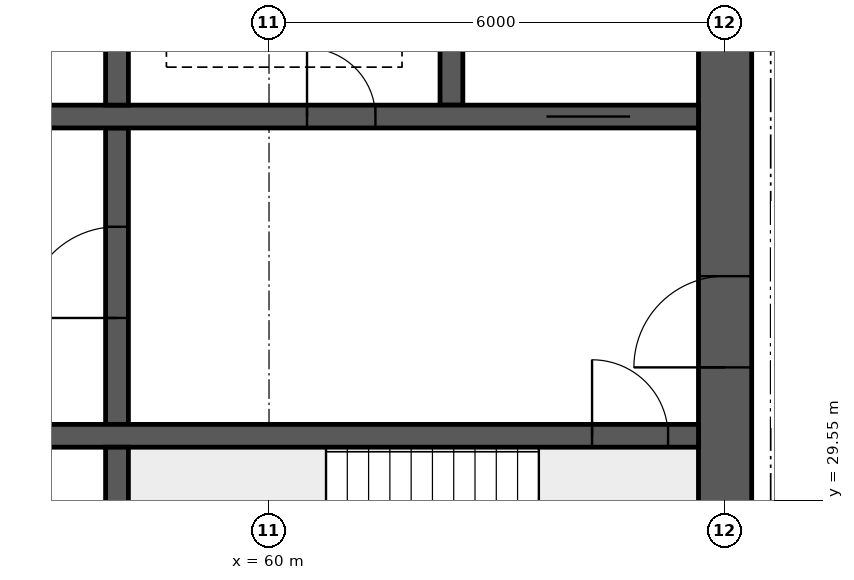
"""IFC4 building model, lengths in metres.
Left out: names, types, materials, properties, quantities, classifications, styles, units other than length and angle.
Written with IfcOpenShell. Run it as: python <this file> out.ifc"""

import sys

from ifc_helpers import new_model, si_unit, direction, frame, frame_2d, origin, place, context, subcontext, project, spatial, rectangle, extrude, element, fill, save


model = new_model("IFC4")
c1 = context("Model", 3, precision=1e-05, world=origin(), true_north=direction((0.0, 1.0)))
c2 = subcontext(c1, "Body", "Model", "MODEL_VIEW")
j1 = project(units=[si_unit("LENGTHUNIT", "METRE"), si_unit("PLANEANGLEUNIT", "RADIAN")], contexts=[c1])
p1 = place(None, origin())
s1 = spatial("IfcSite", under=j1, at=p1, CompositionType="ELEMENT")
p2 = place(p1, origin())
s2 = spatial("IfcBuilding", under=s1, at=p2, CompositionType="ELEMENT")
p3 = place(p2, frame((0.0, 0.0, 224.05)))
s3 = spatial("IfcBuildingStorey", under=s2, at=p3, CompositionType="ELEMENT", Elevation=224.05)
p4 = place(p3, frame((66.0, 26.15, 0.0), z_axis=(0.0, 0.0, 1.0), x_axis=(0.0, 1.0, 0.0)))
e1 = element("IfcWall", 1, at=p4, inside=s3, PredefinedType="SHEAR", context=c2, shape_type="SweptSolid", body=[
    extrude(rectangle(XDim=11.7, YDim=0.7, at=frame_2d((5.85, 0.0))), origin(), (0.0, 0.0, 1.0), 3.75),
])
p5 = place(p4, frame((5.15, 0.0, 0.0)))
e2 = element("IfcOpeningElement", 2, at=p5, cuts=e1, PredefinedType="OPENING", context=c2, shape_type="SweptSolid", body=[
    extrude(rectangle(XDim=1.2, YDim=2.1, at=frame_2d((0.6, 1.05))), frame((0.0, 0.36, 0.0), z_axis=(0.0, -1.0, 0.0), x_axis=(1.0, 0.0, 0.0)), (0.0, 0.0, 1.0), 0.72),
])
p6 = place(p3, frame((18.35, 30.4, 0.0), z_axis=(0.0, 0.0, 1.0), x_axis=(1.0, 0.0, 0.0)))
e3 = element("IfcWall", 3, at=p6, inside=s3, PredefinedType="SHEAR", context=c2, shape_type="SweptSolid", body=[
    extrude(rectangle(XDim=47.3, YDim=0.3, at=frame_2d((23.65, 0.0))), origin(), (0.0, 0.0, 1.0), 3.75),
])
p7 = place(p6, frame((0.4, 0.0, 0.0)))
e4 = element("IfcOpeningElement", 4, at=p7, cuts=e3, PredefinedType="OPENING", context=c2, shape_type="SweptSolid", body=[
    extrude(rectangle(XDim=1.0, YDim=2.1, at=frame_2d((0.5, 1.05))), frame((0.0, 0.16, 0.0), z_axis=(0.0, -1.0, 0.0), x_axis=(1.0, 0.0, 0.0)), (0.0, 0.0, 1.0), 0.32),
])
p8 = place(p6, frame((45.9, 0.0, 0.0)))
e5 = element("IfcOpeningElement", 5, at=p8, cuts=e3, PredefinedType="OPENING", context=c2, shape_type="SweptSolid", body=[
    extrude(rectangle(XDim=1.0, YDim=2.1, at=frame_2d((0.5, 1.05))), frame((0.0, 0.16, 0.0), z_axis=(0.0, -1.0, 0.0), x_axis=(1.0, 0.0, 0.0)), (0.0, 0.0, 1.0), 0.32),
])
p9 = place(p6, frame((8.4, 0.0, 0.0)))
e6 = element("IfcOpeningElement", 6, at=p9, cuts=e3, PredefinedType="OPENING", context=c2, shape_type="SweptSolid", body=[
    extrude(rectangle(XDim=1.1, YDim=2.1, at=frame_2d((0.55, 1.05))), frame((0.0, 0.16, 0.0), z_axis=(0.0, -1.0, 0.0), x_axis=(1.0, 0.0, 0.0)), (0.0, 0.0, 1.0), 0.32),
])
p10 = place(p6, frame((11.0, 0.0, 0.0)))
e7 = element("IfcOpeningElement", 7, at=p10, cuts=e3, PredefinedType="OPENING", context=c2, shape_type="SweptSolid", body=[
    extrude(rectangle(XDim=1.1, YDim=2.1, at=frame_2d((0.55, 1.05))), frame((0.0, 0.16, 0.0), z_axis=(0.0, -1.0, 0.0), x_axis=(1.0, 0.0, 0.0)), (0.0, 0.0, 1.0), 0.32),
])
p11 = place(p6, frame((13.6, 0.0, 0.0)))
e8 = element("IfcOpeningElement", 8, at=p11, cuts=e3, PredefinedType="OPENING", context=c2, shape_type="SweptSolid", body=[
    extrude(rectangle(XDim=1.1, YDim=2.1, at=frame_2d((0.55, 1.05))), frame((0.0, 0.16, 0.0), z_axis=(0.0, -1.0, 0.0), x_axis=(1.0, 0.0, 0.0)), (0.0, 0.0, 1.0), 0.32),
])
p12 = place(p6, frame((16.2, 0.0, 0.0)))
e9 = element("IfcOpeningElement", 9, at=p12, cuts=e3, PredefinedType="OPENING", context=c2, shape_type="SweptSolid", body=[
    extrude(rectangle(XDim=1.1, YDim=2.1, at=frame_2d((0.55, 1.05))), frame((0.0, 0.16, 0.0), z_axis=(0.0, -1.0, 0.0), x_axis=(1.0, 0.0, 0.0)), (0.0, 0.0, 1.0), 0.32),
])
p13 = place(p6, frame((18.975, 0.0, 0.0)))
e10 = element("IfcOpeningElement", 10, at=p13, cuts=e3, PredefinedType="OPENING", context=c2, shape_type="SweptSolid", body=[
    extrude(rectangle(XDim=0.9, YDim=2.1, at=frame_2d((0.45, 1.05))), frame((0.0, 0.16, 0.0), z_axis=(0.0, -1.0, 0.0), x_axis=(1.0, 0.0, 0.0)), (0.0, 0.0, 1.0), 0.32),
])
p14 = place(p6, frame((24.475, 0.0, 0.0)))
e11 = element("IfcOpeningElement", 11, at=p14, cuts=e3, PredefinedType="OPENING", context=c2, shape_type="SweptSolid", body=[
    extrude(rectangle(XDim=0.9, YDim=2.1, at=frame_2d((0.45, 1.05))), frame((0.0, 0.16, 0.0), z_axis=(0.0, -1.0, 0.0), x_axis=(1.0, 0.0, 0.0)), (0.0, 0.0, 1.0), 0.32),
])
p15 = place(p6, frame((30.267, 0.0, 0.0)))
e12 = element("IfcOpeningElement", 12, at=p15, cuts=e3, PredefinedType="OPENING", context=c2, shape_type="SweptSolid", body=[
    extrude(rectangle(XDim=1.1, YDim=2.1, at=frame_2d((0.55, 1.05))), frame((0.0, 0.16, 0.0), z_axis=(0.0, -1.0, 0.0), x_axis=(1.0, 0.0, 0.0)), (0.0, 0.0, 1.0), 0.32),
])
p16 = place(p6, frame((33.8, 0.0, 0.0)))
e13 = element("IfcOpeningElement", 13, at=p16, cuts=e3, PredefinedType="OPENING", context=c2, shape_type="SweptSolid", body=[
    extrude(rectangle(XDim=1.1, YDim=2.1, at=frame_2d((0.55, 1.05))), frame((0.0, 0.16, 0.0), z_axis=(0.0, -1.0, 0.0), x_axis=(1.0, 0.0, 0.0)), (0.0, 0.0, 1.0), 0.32),
])
p17 = place(p6, frame((37.333, 0.0, 0.0)))
e14 = element("IfcOpeningElement", 14, at=p17, cuts=e3, PredefinedType="OPENING", context=c2, shape_type="SweptSolid", body=[
    extrude(rectangle(XDim=1.1, YDim=2.1, at=frame_2d((0.55, 1.05))), frame((0.0, 0.16, 0.0), z_axis=(0.0, -1.0, 0.0), x_axis=(1.0, 0.0, 0.0)), (0.0, 0.0, 1.0), 0.32),
])
p18 = place(p3, frame((18.35, 34.6, 0.0), z_axis=(0.0, 0.0, 1.0), x_axis=(1.0, 0.0, 0.0)))
e15 = element("IfcWall", 15, at=p18, inside=s3, PredefinedType="SHEAR", context=c2, shape_type="SweptSolid", body=[
    extrude(rectangle(XDim=47.3, YDim=0.3, at=frame_2d((23.65, 0.0))), origin(), (0.0, 0.0, 1.0), 3.75),
])
p19 = place(p18, frame((0.9, 0.0, 0.0)))
e16 = element("IfcOpeningElement", 16, at=p19, cuts=e15, PredefinedType="OPENING", context=c2, shape_type="SweptSolid", body=[
    extrude(rectangle(XDim=1.1, YDim=2.1, at=frame_2d((0.55, 1.05))), frame((0.0, 0.16, 0.0), z_axis=(0.0, -1.0, 0.0), x_axis=(1.0, 0.0, 0.0)), (0.0, 0.0, 1.0), 0.32),
])
p20 = place(p18, frame((45.3, 0.0, 0.0)))
e17 = element("IfcOpeningElement", 17, at=p20, cuts=e15, PredefinedType="OPENING", context=c2, shape_type="SweptSolid", body=[
    extrude(rectangle(XDim=1.1, YDim=2.1, at=frame_2d((0.55, 1.05))), frame((0.0, 0.16, 0.0), z_axis=(0.0, -1.0, 0.0), x_axis=(1.0, 0.0, 0.0)), (0.0, 0.0, 1.0), 0.32),
])
p21 = place(p18, frame((4.25, 0.0, 0.0)))
e18 = element("IfcOpeningElement", 18, at=p21, cuts=e15, PredefinedType="OPENING", context=c2, shape_type="SweptSolid", body=[
    extrude(rectangle(XDim=0.9, YDim=2.1, at=frame_2d((0.45, 1.05))), frame((0.0, 0.16, 0.0), z_axis=(0.0, -1.0, 0.0), x_axis=(1.0, 0.0, 0.0)), (0.0, 0.0, 1.0), 0.32),
])
p22 = place(p18, frame((42.15, 0.0, 0.0)))
e19 = element("IfcOpeningElement", 19, at=p22, cuts=e15, PredefinedType="OPENING", context=c2, shape_type="SweptSolid", body=[
    extrude(rectangle(XDim=0.9, YDim=2.1, at=frame_2d((0.45, 1.05))), frame((0.0, 0.16, 0.0), z_axis=(0.0, -1.0, 0.0), x_axis=(1.0, 0.0, 0.0)), (0.0, 0.0, 1.0), 0.32),
])
p23 = place(p18, frame((9.025, 0.0, 0.0)))
e20 = element("IfcOpeningElement", 20, at=p23, cuts=e15, PredefinedType="OPENING", context=c2, shape_type="SweptSolid", body=[
    extrude(rectangle(XDim=0.9, YDim=2.1, at=frame_2d((0.45, 1.05))), frame((0.0, 0.16, 0.0), z_axis=(0.0, -1.0, 0.0), x_axis=(1.0, 0.0, 0.0)), (0.0, 0.0, 1.0), 0.32),
])
p24 = place(p18, frame((12.999, 0.0, 0.0)))
e21 = element("IfcOpeningElement", 21, at=p24, cuts=e15, PredefinedType="OPENING", context=c2, shape_type="SweptSolid", body=[
    extrude(rectangle(XDim=0.9, YDim=2.1, at=frame_2d((0.45, 1.05))), frame((0.0, 0.16, 0.0), z_axis=(0.0, -1.0, 0.0), x_axis=(1.0, 0.0, 0.0)), (0.0, 0.0, 1.0), 0.32),
])
p25 = place(p18, frame((16.646, 0.0, 0.0)))
e22 = element("IfcOpeningElement", 22, at=p25, cuts=e15, PredefinedType="OPENING", context=c2, shape_type="SweptSolid", body=[
    extrude(rectangle(XDim=0.9, YDim=2.1, at=frame_2d((0.45, 1.05))), frame((0.0, 0.16, 0.0), z_axis=(0.0, -1.0, 0.0), x_axis=(1.0, 0.0, 0.0)), (0.0, 0.0, 1.0), 0.32),
])
p26 = place(p18, frame((20.405, 0.0, 0.0)))
e23 = element("IfcOpeningElement", 23, at=p26, cuts=e15, PredefinedType="OPENING", context=c2, shape_type="SweptSolid", body=[
    extrude(rectangle(XDim=0.9, YDim=2.1, at=frame_2d((0.45, 1.05))), frame((0.0, 0.16, 0.0), z_axis=(0.0, -1.0, 0.0), x_axis=(1.0, 0.0, 0.0)), (0.0, 0.0, 1.0), 0.32),
])
p27 = place(p18, frame((24.811, 0.0, 0.0)))
e24 = element("IfcOpeningElement", 24, at=p27, cuts=e15, PredefinedType="OPENING", context=c2, shape_type="SweptSolid", body=[
    extrude(rectangle(XDim=0.9, YDim=2.1, at=frame_2d((0.45, 1.05))), frame((0.0, 0.16, 0.0), z_axis=(0.0, -1.0, 0.0), x_axis=(1.0, 0.0, 0.0)), (0.0, 0.0, 1.0), 0.32),
])
p28 = place(p18, frame((27.608, 0.0, 0.0)))
e25 = element("IfcOpeningElement", 25, at=p28, cuts=e15, PredefinedType="OPENING", context=c2, shape_type="SweptSolid", body=[
    extrude(rectangle(XDim=0.9, YDim=2.1, at=frame_2d((0.45, 1.05))), frame((0.0, 0.16, 0.0), z_axis=(0.0, -1.0, 0.0), x_axis=(1.0, 0.0, 0.0)), (0.0, 0.0, 1.0), 0.32),
])
p29 = place(p18, frame((29.575, 0.0, 0.0)))
e26 = element("IfcOpeningElement", 26, at=p29, cuts=e15, PredefinedType="OPENING", context=c2, shape_type="SweptSolid", body=[
    extrude(rectangle(XDim=0.9, YDim=2.1, at=frame_2d((0.45, 1.05))), frame((0.0, 0.16, 0.0), z_axis=(0.0, -1.0, 0.0), x_axis=(1.0, 0.0, 0.0)), (0.0, 0.0, 1.0), 0.32),
])
p30 = place(p18, frame((32.007, 0.0, 0.0)))
e27 = element("IfcOpeningElement", 27, at=p30, cuts=e15, PredefinedType="OPENING", context=c2, shape_type="SweptSolid", body=[
    extrude(rectangle(XDim=0.9, YDim=2.1, at=frame_2d((0.45, 1.05))), frame((0.0, 0.16, 0.0), z_axis=(0.0, -1.0, 0.0), x_axis=(1.0, 0.0, 0.0)), (0.0, 0.0, 1.0), 0.32),
])
p31 = place(p18, frame((34.742, 0.0, 0.0)))
e28 = element("IfcOpeningElement", 28, at=p31, cuts=e15, PredefinedType="OPENING", context=c2, shape_type="SweptSolid", body=[
    extrude(rectangle(XDim=0.9, YDim=2.1, at=frame_2d((0.45, 1.05))), frame((0.0, 0.16, 0.0), z_axis=(0.0, -1.0, 0.0), x_axis=(1.0, 0.0, 0.0)), (0.0, 0.0, 1.0), 0.32),
])
p32 = place(p18, frame((37.781, 0.0, 0.0)))
e29 = element("IfcOpeningElement", 29, at=p32, cuts=e15, PredefinedType="OPENING", context=c2, shape_type="SweptSolid", body=[
    extrude(rectangle(XDim=0.9, YDim=2.1, at=frame_2d((0.45, 1.05))), frame((0.0, 0.16, 0.0), z_axis=(0.0, -1.0, 0.0), x_axis=(1.0, 0.0, 0.0)), (0.0, 0.0, 1.0), 0.32),
])
p33 = place(p3, frame((58.0, 26.15, 0.0), z_axis=(0.0, 0.0, 1.0), x_axis=(0.0, 1.0, 0.0)))
e30 = element("IfcWall", 30, at=p33, inside=s3, PredefinedType="SHEAR", context=c2, shape_type="SweptSolid", body=[
    extrude(rectangle(XDim=4.1, YDim=0.3, at=frame_2d((2.05, 0.0))), origin(), (0.0, 0.0, 1.0), 3.75),
])
p34 = place(p3, frame((58.0, 30.55, 0.0), z_axis=(0.0, 0.0, 1.0), x_axis=(0.0, 1.0, 0.0)))
e31 = element("IfcWall", 31, at=p34, inside=s3, PredefinedType="SHEAR", context=c2, shape_type="SweptSolid", body=[
    extrude(rectangle(XDim=3.9, YDim=0.3, at=frame_2d((1.95, 0.0))), origin(), (0.0, 0.0, 1.0), 3.75),
])
p35 = place(p34, frame((1.4, 0.0, 0.0)))
e32 = element("IfcOpeningElement", 32, at=p35, cuts=e31, PredefinedType="OPENING", context=c2, shape_type="SweptSolid", body=[
    extrude(rectangle(XDim=1.2, YDim=2.1, at=frame_2d((0.6, 1.05))), frame((0.0, 0.16, 0.0), z_axis=(0.0, -1.0, 0.0), x_axis=(1.0, 0.0, 0.0)), (0.0, 0.0, 1.0), 0.32),
])
for number, where, z_axis, x_axis in (
    (33, (62.4, 34.75, 0.0), (0.0, 0.0, 1.0), (0.0, 1.0, 0.0)),
    (34, (58.0, 34.75, 0.0), (0.0, 0.0, 1.0), (0.0, 1.0, 0.0)),
):
    element("IfcWall", number, at=place(p3, frame(where, z_axis=z_axis, x_axis=x_axis)), inside=s3, PredefinedType="SHEAR", context=c2, shape_type="SweptSolid", body=[
        extrude(rectangle(XDim=3.1, YDim=0.3, at=frame_2d((1.55, 0.0))), origin(), (0.0, 0.0, 1.0), 3.75),
    ])
p36 = place(p5, origin())
e35 = element("IfcDoor", 35, at=p36, inside=s3, OperationType="SINGLE_SWING_LEFT", PredefinedType="DOOR", context=c2, shape_type="SweptSolid", body=[
    extrude(rectangle(XDim=1.2, YDim=2.1, at=frame_2d((0.6, 1.05))), frame((0.0, 0.025, 0.0), z_axis=(0.0, -1.0, 0.0), x_axis=(1.0, 0.0, 0.0)), (0.0, 0.0, 1.0), 0.05),
])
fill(e2, e35)
p37 = place(p8, origin())
e36 = element("IfcDoor", 36, at=p37, inside=s3, OperationType="SINGLE_SWING_LEFT", PredefinedType="DOOR", context=c2, shape_type="SweptSolid", body=[
    extrude(rectangle(XDim=1.0, YDim=2.1, at=frame_2d((0.5, 1.05))), frame((0.0, 0.025, 0.0), z_axis=(0.0, -1.0, 0.0), x_axis=(1.0, 0.0, 0.0)), (0.0, 0.0, 1.0), 0.05),
])
fill(e5, e36)
p38 = place(p20, origin())
e37 = element("IfcDoor", 37, at=p38, inside=s3, OperationType="DOUBLE_DOOR_SLIDING", PredefinedType="DOOR", context=c2, shape_type="SweptSolid", body=[
    extrude(rectangle(XDim=1.1, YDim=2.1, at=frame_2d((0.55, 1.05))), frame((0.0, 0.025, 0.0), z_axis=(0.0, -1.0, 0.0), x_axis=(1.0, 0.0, 0.0)), (0.0, 0.0, 1.0), 0.05),
])
fill(e17, e37)
p39 = place(p22, origin())
e38 = element("IfcDoor", 38, at=p39, inside=s3, OperationType="SINGLE_SWING_LEFT", PredefinedType="DOOR", context=c2, shape_type="SweptSolid", body=[
    extrude(rectangle(XDim=0.9, YDim=2.1, at=frame_2d((0.45, 1.05))), frame((0.0, 0.025, 0.0), z_axis=(0.0, -1.0, 0.0), x_axis=(1.0, 0.0, 0.0)), (0.0, 0.0, 1.0), 0.05),
])
fill(e19, e38)
p40 = place(p35, origin())
e39 = element("IfcDoor", 39, at=p40, inside=s3, OperationType="SINGLE_SWING_LEFT", PredefinedType="DOOR", context=c2, shape_type="SweptSolid", body=[
    extrude(rectangle(XDim=1.2, YDim=2.1, at=frame_2d((0.6, 1.05))), frame((0.0, 0.025, 0.0), z_axis=(0.0, -1.0, 0.0), x_axis=(1.0, 0.0, 0.0)), (0.0, 0.0, 1.0), 0.05),
])
fill(e32, e39)
save(model, sys.argv[1])
